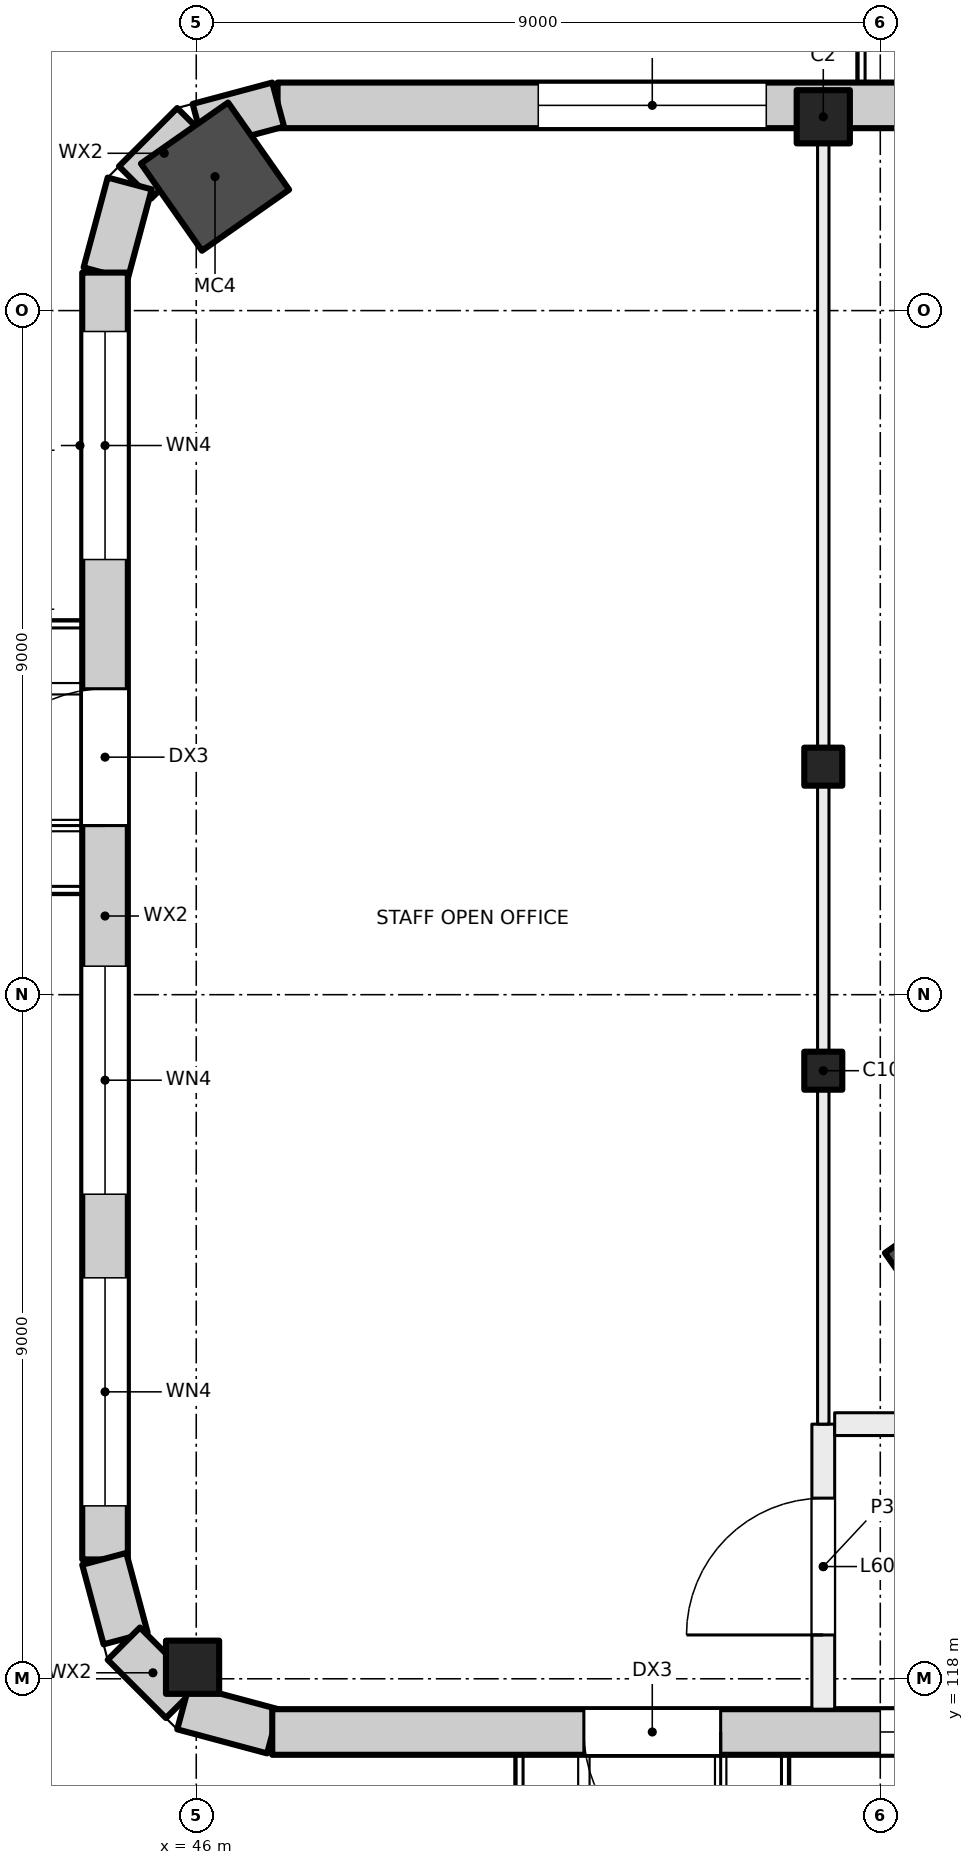
"""IFC4 building model, lengths in metres.
Left out: names, types, materials, properties, quantities, classifications, styles, units other than length and angle.
Written with IfcOpenShell. Run it as: python <this file> out.ifc"""

import sys

from ifc_helpers import new_model, si_unit, direction, frame, frame_2d, origin, origin_2d, place, context, subcontext, project, spatial, rectangle, hollow_rectangle, extrude, element, fill, save


model = new_model("IFC4")
c1 = context("Model", 3, precision=1e-05, world=origin(), true_north=direction((0.0, 1.0)))
c2 = subcontext(c1, "Body", "Model", "MODEL_VIEW")
j1 = project(units=[si_unit("LENGTHUNIT", "METRE"), si_unit("PLANEANGLEUNIT", "RADIAN")], contexts=[c1])
p1 = place(None, origin())
s1 = spatial("IfcSite", under=j1, at=p1, CompositionType="ELEMENT")
p2 = place(p1, origin())
s2 = spatial("IfcBuilding", under=s1, at=p2, CompositionType="ELEMENT")
p3 = place(p2, frame((0.0, 0.0, 253.5)))
s3 = spatial("IfcBuildingStorey", under=s2, at=p3, CompositionType="ELEMENT", Elevation=253.5)
for number, where, z_axis, x_axis in (
    (1, (46.247, 137.762, 0.0), (0.0, 0.0, 1.0), (0.574, -0.819, 0.0)),
    (2, (56.036, 123.43, 0.0), (0.0, 0.0, 1.0), (0.574, -0.819, 0.0)),
):
    element("IfcColumn", number, at=place(p3, frame(where, z_axis=z_axis, x_axis=x_axis)), inside=s3, PredefinedType="COLUMN", context=c2, shape_type="SweptSolid", body=[
        extrude(hollow_rectangle(XDim=1.4, YDim=1.4, WallThickness=0.025, at=origin_2d()), origin(), (0.0, 0.0, 1.0), 4.0),
    ])
for number, where, z_axis, x_axis in (
    (3, (54.25, 130.0, 0.0), (0.0, 0.0, 1.0), (1.0, 0.0, 0.0)),
    (4, (54.25, 126.0, 0.0), (0.0, 0.0, 1.0), (1.0, 0.0, 0.0)),
):
    element("IfcColumn", number, at=place(p3, frame(where, z_axis=z_axis, x_axis=x_axis)), inside=s3, PredefinedType="COLUMN", context=c2, shape_type="SweptSolid", body=[
        extrude(rectangle(XDim=0.5, YDim=0.5, at=origin_2d()), origin(), (0.0, 0.0, 1.0), 4.0),
    ])
for number, where, z_axis, x_axis in (
    (5, (54.25, 138.55, 0.0), (0.0, 0.0, 1.0), (1.0, 0.0, 0.0)),
    (6, (45.952, 118.152, 0.0), (0.0, 0.0, 1.0), (1.0, 0.0, 0.0)),
):
    element("IfcColumn", number, at=place(p3, frame(where, z_axis=z_axis, x_axis=x_axis)), inside=s3, PredefinedType="COLUMN", context=c2, shape_type="SweptSolid", body=[
        extrude(rectangle(XDim=0.7, YDim=0.7, at=origin_2d()), origin(), (0.0, 0.0, 1.0), 4.0),
    ])
p4 = place(p3, frame((47.07, 138.7, 0.0), z_axis=(0.0, 0.0, 1.0), x_axis=(1.0, 0.0, 0.0)))
e7 = element("IfcWall", 7, at=p4, inside=s3, PredefinedType="SOLIDWALL", context=c2, shape_type="SweptSolid", body=[
    extrude(rectangle(XDim=43.91, YDim=0.6, at=frame_2d((21.955, 0.0))), origin(), (0.0, 0.0, 1.0), 3.625),
])
p5 = place(p4, frame((3.43, 0.0, 0.9)))
e8 = element("IfcOpeningElement", 8, at=p5, cuts=e7, PredefinedType="OPENING", context=c2, shape_type="SweptSolid", body=[
    extrude(rectangle(XDim=3.0, YDim=2.4, at=frame_2d((1.5, 1.2))), frame((0.0, 0.31, 0.0), z_axis=(0.0, -1.0, 0.0), x_axis=(1.0, 0.0, 0.0)), (0.0, 0.0, 1.0), 0.62),
])
p6 = place(p4, frame((8.53, 0.0, 0.0)))
e9 = element("IfcOpeningElement", 9, at=p6, cuts=e7, PredefinedType="OPENING", context=c2, shape_type="SweptSolid", body=[
    extrude(rectangle(XDim=1.8, YDim=2.4, at=frame_2d((0.9, 1.2))), frame((0.0, 0.31, 0.0), z_axis=(0.0, -1.0, 0.0), x_axis=(1.0, 0.0, 0.0)), (0.0, 0.0, 1.0), 0.62),
])
p7 = place(p4, frame((12.43, 0.0, 0.9)))
e10 = element("IfcOpeningElement", 10, at=p7, cuts=e7, PredefinedType="OPENING", context=c2, shape_type="SweptSolid", body=[
    extrude(rectangle(XDim=3.0, YDim=2.4, at=frame_2d((1.5, 1.2))), frame((0.0, 0.31, 0.0), z_axis=(0.0, -1.0, 0.0), x_axis=(1.0, 0.0, 0.0)), (0.0, 0.0, 1.0), 0.62),
])
p8 = place(p4, frame((16.93, 0.0, 0.9)))
e11 = element("IfcOpeningElement", 11, at=p8, cuts=e7, PredefinedType="OPENING", context=c2, shape_type="SweptSolid", body=[
    extrude(rectangle(XDim=3.0, YDim=2.4, at=frame_2d((1.5, 1.2))), frame((0.0, 0.31, 0.0), z_axis=(0.0, -1.0, 0.0), x_axis=(1.0, 0.0, 0.0)), (0.0, 0.0, 1.0), 0.62),
])
p9 = place(p4, frame((22.03, 0.0, 0.0)))
e12 = element("IfcOpeningElement", 12, at=p9, cuts=e7, PredefinedType="OPENING", context=c2, shape_type="SweptSolid", body=[
    extrude(rectangle(XDim=1.8, YDim=2.4, at=frame_2d((0.9, 1.2))), frame((0.0, 0.31, 0.0), z_axis=(0.0, -1.0, 0.0), x_axis=(1.0, 0.0, 0.0)), (0.0, 0.0, 1.0), 0.62),
])
p10 = place(p4, frame((25.93, 0.0, 0.9)))
e13 = element("IfcOpeningElement", 13, at=p10, cuts=e7, PredefinedType="OPENING", context=c2, shape_type="SweptSolid", body=[
    extrude(rectangle(XDim=3.0, YDim=2.4, at=frame_2d((1.5, 1.2))), frame((0.0, 0.31, 0.0), z_axis=(0.0, -1.0, 0.0), x_axis=(1.0, 0.0, 0.0)), (0.0, 0.0, 1.0), 0.62),
])
p11 = place(p4, frame((30.43, 0.0, 0.9)))
e14 = element("IfcOpeningElement", 14, at=p11, cuts=e7, PredefinedType="OPENING", context=c2, shape_type="SweptSolid", body=[
    extrude(rectangle(XDim=3.0, YDim=2.4, at=frame_2d((1.5, 1.2))), frame((0.0, 0.31, 0.0), z_axis=(0.0, -1.0, 0.0), x_axis=(1.0, 0.0, 0.0)), (0.0, 0.0, 1.0), 0.62),
])
p12 = place(p4, frame((34.93, 0.0, 0.9)))
e15 = element("IfcOpeningElement", 15, at=p12, cuts=e7, PredefinedType="OPENING", context=c2, shape_type="SweptSolid", body=[
    extrude(rectangle(XDim=3.0, YDim=2.4, at=frame_2d((1.5, 1.2))), frame((0.0, 0.31, 0.0), z_axis=(0.0, -1.0, 0.0), x_axis=(1.0, 0.0, 0.0)), (0.0, 0.0, 1.0), 0.62),
])
p13 = place(p4, frame((39.43, 0.0, 0.9)))
e16 = element("IfcOpeningElement", 16, at=p13, cuts=e7, PredefinedType="OPENING", context=c2, shape_type="SweptSolid", body=[
    extrude(rectangle(XDim=3.0, YDim=2.4, at=frame_2d((1.5, 1.2))), frame((0.0, 0.31, 0.0), z_axis=(0.0, -1.0, 0.0), x_axis=(1.0, 0.0, 0.0)), (0.0, 0.0, 1.0), 0.62),
])
p14 = place(p3, frame((46.031, 138.43, 0.0), z_axis=(0.0, 0.0, 1.0), x_axis=(0.965939004864, 0.25876985698, 0.0)))
e17 = element("IfcWall", 17, at=p14, inside=s3, PredefinedType="SOLIDWALL", context=c2, shape_type="SweptSolid", body=[
    extrude(rectangle(XDim=1.084, YDim=0.6, at=frame_2d((0.542, 0.0))), origin(), (0.0, 0.0, 1.0), 3.625),
])
p15 = place(p3, frame((45.196, 137.686, 0.0), z_axis=(0.0, 0.0, 1.0), x_axis=(0.707106781187, 0.707106781187, 0.0)))
e18 = element("IfcWall", 18, at=p15, inside=s3, PredefinedType="SOLIDWALL", context=c2, shape_type="SweptSolid", body=[
    extrude(rectangle(XDim=1.084, YDim=0.6, at=frame_2d((0.542, 0.0))), origin(), (0.0, 0.0, 1.0), 3.625),
])
p16 = place(p3, frame((44.808, 136.49, 0.0), z_axis=(0.0, 0.0, 1.0), x_axis=(0.258878975098, 0.965909766102, 0.0)))
e19 = element("IfcWall", 19, at=p16, inside=s3, PredefinedType="SOLIDWALL", context=c2, shape_type="SweptSolid", body=[
    extrude(rectangle(XDim=1.224, YDim=0.6, at=frame_2d((0.612, 0.0))), origin(), (0.0, 0.0, 1.0), 3.625),
])
p17 = place(p3, frame((44.8, 119.57, 0.0), z_axis=(0.0, 0.0, 1.0), x_axis=(0.0, 1.0, 0.0)))
e20 = element("IfcWall", 20, at=p17, inside=s3, PredefinedType="SOLIDWALL", context=c2, shape_type="SweptSolid", body=[
    extrude(rectangle(XDim=16.93, YDim=0.6, at=frame_2d((8.465, 0.0))), origin(), (0.0, 0.0, 1.0), 3.625),
])
p18 = place(p17, frame((0.705, 0.0, 0.9)))
e21 = element("IfcOpeningElement", 21, at=p18, cuts=e20, PredefinedType="OPENING", context=c2, shape_type="SweptSolid", body=[
    extrude(rectangle(XDim=3.0, YDim=2.4, at=frame_2d((1.5, 1.2))), frame((0.0, 0.31, 0.0), z_axis=(0.0, -1.0, 0.0), x_axis=(1.0, 0.0, 0.0)), (0.0, 0.0, 1.0), 0.62),
])
p19 = place(p17, frame((4.805, 0.0, 0.9)))
e22 = element("IfcOpeningElement", 22, at=p19, cuts=e20, PredefinedType="OPENING", context=c2, shape_type="SweptSolid", body=[
    extrude(rectangle(XDim=3.0, YDim=2.4, at=frame_2d((1.5, 1.2))), frame((0.0, 0.31, 0.0), z_axis=(0.0, -1.0, 0.0), x_axis=(1.0, 0.0, 0.0)), (0.0, 0.0, 1.0), 0.62),
])
p20 = place(p17, frame((9.655, 0.0, 0.0)))
e23 = element("IfcOpeningElement", 23, at=p20, cuts=e20, PredefinedType="OPENING", context=c2, shape_type="SweptSolid", body=[
    extrude(rectangle(XDim=1.8, YDim=2.4, at=frame_2d((0.9, 1.2))), frame((0.0, 0.31, 0.0), z_axis=(0.0, -1.0, 0.0), x_axis=(1.0, 0.0, 0.0)), (0.0, 0.0, 1.0), 0.62),
])
p21 = place(p17, frame((13.155, 0.0, 0.9)))
e24 = element("IfcOpeningElement", 24, at=p21, cuts=e20, PredefinedType="OPENING", context=c2, shape_type="SweptSolid", body=[
    extrude(rectangle(XDim=3.0, YDim=2.4, at=frame_2d((1.5, 1.2))), frame((0.0, 0.31, 0.0), z_axis=(0.0, -1.0, 0.0), x_axis=(1.0, 0.0, 0.0)), (0.0, 0.0, 1.0), 0.62),
])
p22 = place(p3, frame((45.07, 118.531, 0.0), z_axis=(0.0, 0.0, 1.0), x_axis=(-0.25876985698, 0.965939004864, 0.0)))
e25 = element("IfcWall", 25, at=p22, inside=s3, PredefinedType="SOLIDWALL", context=c2, shape_type="SweptSolid", body=[
    extrude(rectangle(XDim=1.084, YDim=0.6, at=frame_2d((0.542, 0.0))), origin(), (0.0, 0.0, 1.0), 3.625),
])
p23 = place(p3, frame((45.814, 117.696, 0.0), z_axis=(0.0, 0.0, 1.0), x_axis=(-0.707106781187, 0.707106781187, 0.0)))
e26 = element("IfcWall", 26, at=p23, inside=s3, PredefinedType="SOLIDWALL", context=c2, shape_type="SweptSolid", body=[
    extrude(rectangle(XDim=1.084, YDim=0.6, at=frame_2d((0.542, 0.0))), origin(), (0.0, 0.0, 1.0), 3.625),
])
p24 = place(p3, frame((47.01, 117.308, 0.0), z_axis=(0.0, 0.0, 1.0), x_axis=(-0.965909766102, 0.258878975098, 0.0)))
e27 = element("IfcWall", 27, at=p24, inside=s3, PredefinedType="SOLIDWALL", context=c2, shape_type="SweptSolid", body=[
    extrude(rectangle(XDim=1.224, YDim=0.6, at=frame_2d((0.612, 0.0))), origin(), (0.0, 0.0, 1.0), 3.625),
])
p25 = place(p3, frame((90.98, 117.3, 0.0), z_axis=(0.0, 0.0, 1.0), x_axis=(-1.0, 0.0, 0.0)))
e28 = element("IfcWall", 28, at=p25, inside=s3, PredefinedType="SOLIDWALL", context=c2, shape_type="SweptSolid", body=[
    extrude(rectangle(XDim=43.98, YDim=0.6, at=frame_2d((21.99, 0.0))), origin(), (0.0, 0.0, 1.0), 3.625),
])
p26 = place(p25, frame((1.48, 0.0, 0.9)))
e29 = element("IfcOpeningElement", 29, at=p26, cuts=e28, PredefinedType="OPENING", context=c2, shape_type="SweptSolid", body=[
    extrude(rectangle(XDim=3.0, YDim=2.4, at=frame_2d((1.5, 1.2))), frame((0.0, 0.31, 0.0), z_axis=(0.0, -1.0, 0.0), x_axis=(1.0, 0.0, 0.0)), (0.0, 0.0, 1.0), 0.62),
])
p27 = place(p25, frame((5.98, 0.0, 0.9)))
e30 = element("IfcOpeningElement", 30, at=p27, cuts=e28, PredefinedType="OPENING", context=c2, shape_type="SweptSolid", body=[
    extrude(rectangle(XDim=3.0, YDim=2.4, at=frame_2d((1.5, 1.2))), frame((0.0, 0.31, 0.0), z_axis=(0.0, -1.0, 0.0), x_axis=(1.0, 0.0, 0.0)), (0.0, 0.0, 1.0), 0.62),
])
p28 = place(p25, frame((10.48, 0.0, 0.9)))
e31 = element("IfcOpeningElement", 31, at=p28, cuts=e28, PredefinedType="OPENING", context=c2, shape_type="SweptSolid", body=[
    extrude(rectangle(XDim=3.0, YDim=2.4, at=frame_2d((1.5, 1.2))), frame((0.0, 0.31, 0.0), z_axis=(0.0, -1.0, 0.0), x_axis=(1.0, 0.0, 0.0)), (0.0, 0.0, 1.0), 0.62),
])
p29 = place(p25, frame((14.98, 0.0, 0.9)))
e32 = element("IfcOpeningElement", 32, at=p29, cuts=e28, PredefinedType="OPENING", context=c2, shape_type="SweptSolid", body=[
    extrude(rectangle(XDim=3.0, YDim=2.4, at=frame_2d((1.5, 1.2))), frame((0.0, 0.31, 0.0), z_axis=(0.0, -1.0, 0.0), x_axis=(1.0, 0.0, 0.0)), (0.0, 0.0, 1.0), 0.62),
])
p30 = place(p25, frame((19.48, 0.0, 0.9)))
e33 = element("IfcOpeningElement", 33, at=p30, cuts=e28, PredefinedType="OPENING", context=c2, shape_type="SweptSolid", body=[
    extrude(rectangle(XDim=3.0, YDim=2.4, at=frame_2d((1.5, 1.2))), frame((0.0, 0.31, 0.0), z_axis=(0.0, -1.0, 0.0), x_axis=(1.0, 0.0, 0.0)), (0.0, 0.0, 1.0), 0.62),
])
p31 = place(p25, frame((24.58, 0.0, 0.0)))
e34 = element("IfcOpeningElement", 34, at=p31, cuts=e28, PredefinedType="OPENING", context=c2, shape_type="SweptSolid", body=[
    extrude(rectangle(XDim=1.8, YDim=2.4, at=frame_2d((0.9, 1.2))), frame((0.0, 0.31, 0.0), z_axis=(0.0, -1.0, 0.0), x_axis=(1.0, 0.0, 0.0)), (0.0, 0.0, 1.0), 0.62),
])
p32 = place(p25, frame((28.48, 0.0, 0.9)))
e35 = element("IfcOpeningElement", 35, at=p32, cuts=e28, PredefinedType="OPENING", context=c2, shape_type="SweptSolid", body=[
    extrude(rectangle(XDim=3.0, YDim=2.4, at=frame_2d((1.5, 1.2))), frame((0.0, 0.31, 0.0), z_axis=(0.0, -1.0, 0.0), x_axis=(1.0, 0.0, 0.0)), (0.0, 0.0, 1.0), 0.62),
])
p33 = place(p25, frame((32.98, 0.0, 0.9)))
e36 = element("IfcOpeningElement", 36, at=p33, cuts=e28, PredefinedType="OPENING", context=c2, shape_type="SweptSolid", body=[
    extrude(rectangle(XDim=3.0, YDim=2.4, at=frame_2d((1.5, 1.2))), frame((0.0, 0.31, 0.0), z_axis=(0.0, -1.0, 0.0), x_axis=(1.0, 0.0, 0.0)), (0.0, 0.0, 1.0), 0.62),
])
p34 = place(p25, frame((38.08, 0.0, 0.0)))
e37 = element("IfcOpeningElement", 37, at=p34, cuts=e28, PredefinedType="OPENING", context=c2, shape_type="SweptSolid", body=[
    extrude(rectangle(XDim=1.8, YDim=2.4, at=frame_2d((0.9, 1.2))), frame((0.0, 0.31, 0.0), z_axis=(0.0, -1.0, 0.0), x_axis=(1.0, 0.0, 0.0)), (0.0, 0.0, 1.0), 0.62),
])
p35 = place(p3, frame((54.25, 117.6, 0.0), z_axis=(0.0, 0.0, 1.0), x_axis=(0.0, 1.0, 0.0)))
e38 = element("IfcWall", 38, at=p35, inside=s3, PredefinedType="PARTITIONING", context=c2, shape_type="SweptSolid", body=[
    extrude(rectangle(XDim=3.75, YDim=0.3, at=frame_2d((1.875, 0.0))), origin(), (0.0, 0.0, 1.0), 3.625),
])
p36 = place(p35, frame((0.977, 0.0, 0.0)))
e39 = element("IfcOpeningElement", 39, at=p36, cuts=e38, PredefinedType="OPENING", context=c2, shape_type="SweptSolid", body=[
    extrude(rectangle(XDim=1.8, YDim=2.1, at=frame_2d((0.9, 1.05))), frame((0.0, 0.16, 0.0), z_axis=(0.0, -1.0, 0.0), x_axis=(1.0, 0.0, 0.0)), (0.0, 0.0, 1.0), 0.32),
])
p37 = place(p3, frame((54.4, 121.35, 0.0), z_axis=(0.0, 0.0, 1.0), x_axis=(1.0, 0.0, 0.0)))
e40 = element("IfcWall", 40, at=p37, inside=s3, PredefinedType="PARTITIONING", context=c2, shape_type="SweptSolid", body=[
    extrude(rectangle(XDim=31.353, YDim=0.3, at=frame_2d((15.677, 0.0))), origin(), (0.0, 0.0, 1.0), 3.625),
])
p38 = place(p37, frame((21.85, 0.0, 0.0)))
e41 = element("IfcOpeningElement", 41, at=p38, cuts=e40, PredefinedType="OPENING", context=c2, shape_type="SweptSolid", body=[
    extrude(rectangle(XDim=1.0, YDim=2.1, at=frame_2d((0.5, 1.05))), frame((0.0, 0.16, 0.0), z_axis=(0.0, -1.0, 0.0), x_axis=(1.0, 0.0, 0.0)), (0.0, 0.0, 1.0), 0.32),
])
p39 = place(p37, frame((12.75, 0.0, 0.0)))
e42 = element("IfcOpeningElement", 42, at=p39, cuts=e40, PredefinedType="OPENING", context=c2, shape_type="SweptSolid", body=[
    extrude(rectangle(XDim=1.2, YDim=2.1, at=frame_2d((0.6, 1.05))), frame((0.0, 0.16, 0.0), z_axis=(0.0, -1.0, 0.0), x_axis=(1.0, 0.0, 0.0)), (0.0, 0.0, 1.0), 0.32),
])
p40 = place(p37, frame((3.515, 0.0, 0.0)))
e43 = element("IfcOpeningElement", 43, at=p40, cuts=e40, PredefinedType="OPENING", context=c2, shape_type="SweptSolid", body=[
    extrude(rectangle(XDim=1.8, YDim=2.1, at=frame_2d((0.9, 1.05))), frame((0.0, 0.16, 0.0), z_axis=(0.0, -1.0, 0.0), x_axis=(1.0, 0.0, 0.0)), (0.0, 0.0, 1.0), 0.32),
])
p41 = place(p3, frame((54.25, 138.4, 0.0), z_axis=(0.0, 0.0, 1.0), x_axis=(0.0, -1.0, 0.0)))
e44 = element("IfcWall", 44, at=p41, inside=s3, PredefinedType="PARTITIONING", context=c2, shape_type="SweptSolid", body=[
    extrude(rectangle(XDim=17.05, YDim=0.15, at=frame_2d((8.525, 0.0))), origin(), (0.0, 0.0, 1.0), 3.625),
])
p42 = place(p5, origin())
e45 = element("IfcWindow", 45, at=p42, inside=s3, PartitioningType="SINGLE_PANEL", PredefinedType="WINDOW", context=c2, shape_type="SweptSolid", body=[
    extrude(rectangle(XDim=3.0, YDim=2.4, at=frame_2d((1.5, 1.2))), frame((0.0, 0.03, 0.0), z_axis=(0.0, -1.0, 0.0), x_axis=(1.0, 0.0, 0.0)), (0.0, 0.0, 1.0), 0.06),
])
fill(e8, e45)
p43 = place(p18, origin())
e46 = element("IfcWindow", 46, at=p43, inside=s3, PartitioningType="SINGLE_PANEL", PredefinedType="WINDOW", context=c2, shape_type="SweptSolid", body=[
    extrude(rectangle(XDim=3.0, YDim=2.4, at=frame_2d((1.5, 1.2))), frame((0.0, 0.03, 0.0), z_axis=(0.0, -1.0, 0.0), x_axis=(1.0, 0.0, 0.0)), (0.0, 0.0, 1.0), 0.06),
])
fill(e21, e46)
p44 = place(p19, origin())
e47 = element("IfcWindow", 47, at=p44, inside=s3, PartitioningType="SINGLE_PANEL", PredefinedType="WINDOW", context=c2, shape_type="SweptSolid", body=[
    extrude(rectangle(XDim=3.0, YDim=2.4, at=frame_2d((1.5, 1.2))), frame((0.0, 0.03, 0.0), z_axis=(0.0, -1.0, 0.0), x_axis=(1.0, 0.0, 0.0)), (0.0, 0.0, 1.0), 0.06),
])
fill(e22, e47)
p45 = place(p20, origin())
e48 = element("IfcDoor", 48, at=p45, inside=s3, OperationType="DOUBLE_DOOR_SINGLE_SWING", PredefinedType="DOOR", context=c2, shape_type="SweptSolid", body=[
    extrude(rectangle(XDim=1.8, YDim=2.4, at=frame_2d((0.9, 1.2))), frame((0.0, 0.025, 0.0), z_axis=(0.0, -1.0, 0.0), x_axis=(1.0, 0.0, 0.0)), (0.0, 0.0, 1.0), 0.05),
])
fill(e23, e48)
p46 = place(p21, origin())
e49 = element("IfcWindow", 49, at=p46, inside=s3, PartitioningType="SINGLE_PANEL", PredefinedType="WINDOW", context=c2, shape_type="SweptSolid", body=[
    extrude(rectangle(XDim=3.0, YDim=2.4, at=frame_2d((1.5, 1.2))), frame((0.0, 0.03, 0.0), z_axis=(0.0, -1.0, 0.0), x_axis=(1.0, 0.0, 0.0)), (0.0, 0.0, 1.0), 0.06),
])
fill(e24, e49)
p47 = place(p33, origin())
e50 = element("IfcWindow", 50, at=p47, inside=s3, PartitioningType="SINGLE_PANEL", PredefinedType="WINDOW", context=c2, shape_type="SweptSolid", body=[
    extrude(rectangle(XDim=3.0, YDim=2.4, at=frame_2d((1.5, 1.2))), frame((0.0, 0.03, 0.0), z_axis=(0.0, -1.0, 0.0), x_axis=(1.0, 0.0, 0.0)), (0.0, 0.0, 1.0), 0.06),
])
fill(e36, e50)
p48 = place(p34, origin())
e51 = element("IfcDoor", 51, at=p48, inside=s3, OperationType="DOUBLE_DOOR_SINGLE_SWING", PredefinedType="DOOR", context=c2, shape_type="SweptSolid", body=[
    extrude(rectangle(XDim=1.8, YDim=2.4, at=frame_2d((0.9, 1.2))), frame((0.0, 0.025, 0.0), z_axis=(0.0, -1.0, 0.0), x_axis=(1.0, 0.0, 0.0)), (0.0, 0.0, 1.0), 0.05),
])
fill(e37, e51)
p49 = place(p36, origin())
e52 = element("IfcDoor", 52, at=p49, inside=s3, OperationType="DOUBLE_DOOR_SINGLE_SWING", PredefinedType="DOOR", context=c2, shape_type="SweptSolid", body=[
    extrude(rectangle(XDim=1.8, YDim=2.1, at=frame_2d((0.9, 1.05))), frame((0.0, 0.025, 0.0), z_axis=(0.0, -1.0, 0.0), x_axis=(1.0, 0.0, 0.0)), (0.0, 0.0, 1.0), 0.05),
])
fill(e39, e52)
save(model, sys.argv[1])
